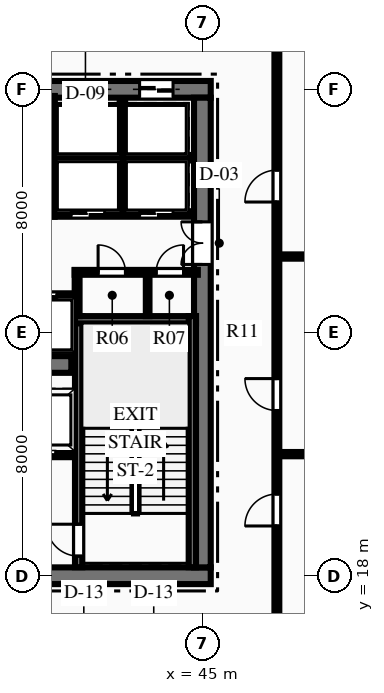
"""IFC4 building model, lengths in metres.
Left out: names, types, materials, properties, quantities, classifications, styles, units other than length and angle.
Written with IfcOpenShell. Run it as: python <this file> out.ifc"""

import sys

from ifc_helpers import new_model, si_unit, direction, frame, frame_2d, origin, place, context, subcontext, project, spatial, rectangle, extrude, element, fill, save


model = new_model("IFC4")
c1 = context("Model", 3, precision=1e-05, world=origin(), true_north=direction((0.0, 1.0)))
c2 = subcontext(c1, "Body", "Model", "MODEL_VIEW")
j1 = project(units=[si_unit("LENGTHUNIT", "METRE"), si_unit("PLANEANGLEUNIT", "RADIAN")], contexts=[c1])
p1 = place(None, origin())
s1 = spatial("IfcSite", under=j1, at=p1, CompositionType="ELEMENT")
p2 = place(p1, origin())
s2 = spatial("IfcBuilding", under=s1, at=p2, CompositionType="ELEMENT")
p3 = place(p2, frame((0.0, 0.0, 90.45)))
s3 = spatial("IfcBuildingStorey", under=s2, at=p3, CompositionType="ELEMENT", Elevation=90.45)
p4 = place(p3, frame((26.725, 18.0, 0.0), z_axis=(0.0, 0.0, 1.0), x_axis=(1.0, 0.0, 0.0)))
e1 = element("IfcWall", 1, at=p4, inside=s3, PredefinedType="SHEAR", context=c2, shape_type="SweptSolid", body=[
    extrude(rectangle(XDim=18.55, YDim=0.55, at=frame_2d((9.275, 0.0))), origin(), (0.0, 0.0, 1.0), 3.75),
])
p5 = place(p4, frame((7.375, 0.0, 0.0)))
e2 = element("IfcOpeningElement", 2, at=p5, cuts=e1, PredefinedType="OPENING", context=c2, shape_type="SweptSolid", body=[
    extrude(rectangle(XDim=1.1, YDim=2.15, at=frame_2d((0.55, 1.075))), frame((0.0, 0.285, 0.0), z_axis=(0.0, -1.0, 0.0), x_axis=(1.0, 0.0, 0.0)), (0.0, 0.0, 1.0), 0.57),
])
p6 = place(p4, frame((10.075, 0.0, 0.0)))
e3 = element("IfcOpeningElement", 3, at=p6, cuts=e1, PredefinedType="OPENING", context=c2, shape_type="SweptSolid", body=[
    extrude(rectangle(XDim=1.1, YDim=2.15, at=frame_2d((0.55, 1.075))), frame((0.0, 0.285, 0.0), z_axis=(0.0, -1.0, 0.0), x_axis=(1.0, 0.0, 0.0)), (0.0, 0.0, 1.0), 0.57),
])
p7 = place(p3, frame((26.725, 34.0, 0.0), z_axis=(0.0, 0.0, 1.0), x_axis=(1.0, 0.0, 0.0)))
e4 = element("IfcWall", 4, at=p7, inside=s3, PredefinedType="SHEAR", context=c2, shape_type="SweptSolid", body=[
    extrude(rectangle(XDim=18.55, YDim=0.55, at=frame_2d((9.275, 0.0))), origin(), (0.0, 0.0, 1.0), 3.75),
])
p8 = place(p7, frame((1.24, 0.0, 0.0)))
e5 = element("IfcOpeningElement", 5, at=p8, cuts=e4, PredefinedType="OPENING", context=c2, shape_type="SweptSolid", body=[
    extrude(rectangle(XDim=1.1, YDim=2.15, at=frame_2d((0.55, 1.075))), frame((0.0, 0.285, 0.0), z_axis=(0.0, -1.0, 0.0), x_axis=(1.0, 0.0, 0.0)), (0.0, 0.0, 1.0), 0.57),
])
p9 = place(p7, frame((3.49, 0.0, 0.0)))
e6 = element("IfcOpeningElement", 6, at=p9, cuts=e4, PredefinedType="OPENING", context=c2, shape_type="SweptSolid", body=[
    extrude(rectangle(XDim=1.1, YDim=2.15, at=frame_2d((0.55, 1.075))), frame((0.0, 0.285, 0.0), z_axis=(0.0, -1.0, 0.0), x_axis=(1.0, 0.0, 0.0)), (0.0, 0.0, 1.0), 0.57),
])
p10 = place(p7, frame((13.96, 0.0, 0.0)))
e7 = element("IfcOpeningElement", 7, at=p10, cuts=e4, PredefinedType="OPENING", context=c2, shape_type="SweptSolid", body=[
    extrude(rectangle(XDim=1.1, YDim=2.15, at=frame_2d((0.55, 1.075))), frame((0.0, 0.285, 0.0), z_axis=(0.0, -1.0, 0.0), x_axis=(1.0, 0.0, 0.0)), (0.0, 0.0, 1.0), 0.57),
])
p11 = place(p7, frame((16.21, 0.0, 0.0)))
e8 = element("IfcOpeningElement", 8, at=p11, cuts=e4, PredefinedType="OPENING", context=c2, shape_type="SweptSolid", body=[
    extrude(rectangle(XDim=1.1, YDim=2.15, at=frame_2d((0.55, 1.075))), frame((0.0, 0.285, 0.0), z_axis=(0.0, -1.0, 0.0), x_axis=(1.0, 0.0, 0.0)), (0.0, 0.0, 1.0), 0.57),
])
p12 = place(p3, frame((45.0, 18.275, 0.0), z_axis=(0.0, 0.0, 1.0), x_axis=(0.0, 1.0, 0.0)))
e9 = element("IfcWall", 9, at=p12, inside=s3, PredefinedType="SHEAR", context=c2, shape_type="SweptSolid", body=[
    extrude(rectangle(XDim=15.45, YDim=0.55, at=frame_2d((7.725, 0.0))), origin(), (0.0, 0.0, 1.0), 3.75),
])
p13 = place(p12, frame((9.965, 0.0, 0.0)))
e10 = element("IfcOpeningElement", 10, at=p13, cuts=e9, PredefinedType="OPENING", context=c2, shape_type="SweptSolid", body=[
    extrude(rectangle(XDim=1.4, YDim=2.2, at=frame_2d((0.7, 1.1))), frame((0.0, 0.285, 0.0), z_axis=(0.0, -1.0, 0.0), x_axis=(1.0, 0.0, 0.0)), (0.0, 0.0, 1.0), 0.57),
])
p14 = place(p3, frame((31.31, 24.95, 0.0), z_axis=(0.0, 0.0, 1.0), x_axis=(1.0, 0.0, 0.0)))
e11 = element("IfcWall", 11, at=p14, inside=s3, PredefinedType="SHEAR", context=c2, shape_type="SweptSolid", body=[
    extrude(rectangle(XDim=9.38, YDim=0.55, at=frame_2d((4.69, 0.0))), origin(), (0.0, 0.0, 1.0), 3.75),
])
p15 = place(p3, frame((40.93, 18.28, 0.0), z_axis=(0.0, 0.0, 1.0), x_axis=(0.0, 1.0, 0.0)))
e12 = element("IfcWall", 12, at=p15, inside=s3, PredefinedType="SHEAR", context=c2, shape_type="SweptSolid", body=[
    extrude(rectangle(XDim=8.26, YDim=0.24, at=frame_2d((4.13, 0.0))), origin(), (0.0, 0.0, 1.0), 3.75),
])
p16 = place(p15, frame((0.365, 0.0, 0.0)))
e13 = element("IfcOpeningElement", 13, at=p16, cuts=e12, PredefinedType="OPENING", context=c2, shape_type="SweptSolid", body=[
    extrude(rectangle(XDim=1.05, YDim=2.15, at=frame_2d((0.525, 1.075))), frame((0.0, 0.13, 0.0), z_axis=(0.0, -1.0, 0.0), x_axis=(1.0, 0.0, 0.0)), (0.0, 0.0, 1.0), 0.26),
])
p17 = place(p3, frame((40.81, 26.42, 0.0), z_axis=(0.0, 0.0, 1.0), x_axis=(1.0, 0.0, 0.0)))
e14 = element("IfcWall", 14, at=p17, inside=s3, PredefinedType="SHEAR", context=c2, shape_type="SweptSolid", body=[
    extrude(rectangle(XDim=3.98, YDim=0.24, at=frame_2d((1.99, 0.0))), origin(), (0.0, 0.0, 1.0), 3.75),
])
p18 = place(p3, frame((44.67, 18.28, 0.0), z_axis=(0.0, 0.0, 1.0), x_axis=(0.0, 1.0, 0.0)))
e15 = element("IfcWall", 15, at=p18, inside=s3, PredefinedType="SHEAR", context=c2, shape_type="SweptSolid", body=[
    extrude(rectangle(XDim=8.26, YDim=0.24, at=frame_2d((4.13, 0.0))), origin(), (0.0, 0.0, 1.0), 3.75),
])
p19 = place(p3, frame((31.76, 29.93, 0.0), z_axis=(0.0, 0.0, 1.0), x_axis=(1.0, 0.0, 0.0)))
e16 = element("IfcWall", 16, at=p19, inside=s3, PredefinedType="SHEAR", context=c2, shape_type="SweptSolid", body=[
    extrude(rectangle(XDim=8.38, YDim=0.24, at=frame_2d((4.19, 0.0))), origin(), (0.0, 0.0, 1.0), 3.75),
])
p20 = place(p19, frame((0.565, 0.0, 0.0)))
e17 = element("IfcOpeningElement", 17, at=p20, cuts=e16, PredefinedType="OPENING", context=c2, shape_type="SweptSolid", body=[
    extrude(rectangle(XDim=1.05, YDim=2.15, at=frame_2d((0.525, 1.075))), frame((0.0, 0.13, 0.0), z_axis=(0.0, -1.0, 0.0), x_axis=(1.0, 0.0, 0.0)), (0.0, 0.0, 1.0), 0.26),
])
p21 = place(p3, frame((40.02, 29.93, 0.0), z_axis=(0.0, 0.0, 1.0), x_axis=(0.0, 1.0, 0.0)))
e18 = element("IfcWall", 18, at=p21, inside=s3, PredefinedType="SHEAR", context=c2, shape_type="SweptSolid", body=[
    extrude(rectangle(XDim=3.85, YDim=0.24, at=frame_2d((1.925, 0.0))), origin(), (0.0, 0.0, 1.0), 3.75),
])
p22 = place(p3, frame((37.85, 33.66, 0.0), z_axis=(0.0, 0.0, 1.0), x_axis=(1.0, 0.0, 0.0)))
e19 = element("IfcWall", 19, at=p22, inside=s3, PredefinedType="SHEAR", context=c2, shape_type="SweptSolid", body=[
    extrude(rectangle(XDim=2.29, YDim=0.24, at=frame_2d((1.145, 0.0))), origin(), (0.0, 0.0, 1.0), 3.75),
])
p23 = place(p3, frame((36.12, 22.0, 0.0), z_axis=(0.0, 0.0, 1.0), x_axis=(1.0, 0.0, 0.0)))
e20 = element("IfcWall", 20, at=p23, inside=s3, PredefinedType="PARTITIONING", context=c2, shape_type="SweptSolid", body=[
    extrude(rectangle(XDim=4.69, YDim=0.2, at=frame_2d((2.345, 0.0))), origin(), (0.0, 0.0, 1.0), 3.45),
])
p24 = place(p23, frame((2.955, 0.0, 0.0)))
e21 = element("IfcOpeningElement", 21, at=p24, cuts=e20, PredefinedType="OPENING", context=c2, shape_type="SweptSolid", body=[
    extrude(rectangle(XDim=1.1, YDim=2.15, at=frame_2d((0.55, 1.075))), frame((0.0, 0.11, 0.0), z_axis=(0.0, -1.0, 0.0), x_axis=(1.0, 0.0, 0.0)), (0.0, 0.0, 1.0), 0.22),
])
p25 = place(p23, frame((0.08, 0.0, 0.0)))
e22 = element("IfcOpeningElement", 22, at=p25, cuts=e20, PredefinedType="OPENING", context=c2, shape_type="SweptSolid", body=[
    extrude(rectangle(XDim=1.4, YDim=2.2, at=frame_2d((0.7, 1.1))), frame((0.0, 0.11, 0.0), z_axis=(0.0, -1.0, 0.0), x_axis=(1.0, 0.0, 0.0)), (0.0, 0.0, 1.0), 0.22),
])
p26 = place(p3, frame((40.8, 27.98, 0.0), z_axis=(0.0, 0.0, 1.0), x_axis=(1.0, 0.0, 0.0)))
e23 = element("IfcWall", 23, at=p26, inside=s3, PredefinedType="PARTITIONING", context=c2, shape_type="SweptSolid", body=[
    extrude(rectangle(XDim=4.05, YDim=0.16, at=frame_2d((2.025, 0.0))), origin(), (0.0, 0.0, 1.0), 3.45),
])
p27 = place(p26, frame((0.77, 0.0, 0.0)))
e24 = element("IfcOpeningElement", 24, at=p27, cuts=e23, PredefinedType="OPENING", context=c2, shape_type="SweptSolid", body=[
    extrude(rectangle(XDim=0.9, YDim=2.15, at=frame_2d((0.45, 1.075))), frame((0.0, 0.09, 0.0), z_axis=(0.0, -1.0, 0.0), x_axis=(1.0, 0.0, 0.0)), (0.0, 0.0, 1.0), 0.18),
])
p28 = place(p26, frame((2.68, 0.0, 0.0)))
e25 = element("IfcOpeningElement", 25, at=p28, cuts=e23, PredefinedType="OPENING", context=c2, shape_type="SweptSolid", body=[
    extrude(rectangle(XDim=0.9, YDim=2.15, at=frame_2d((0.45, 1.075))), frame((0.0, 0.09, 0.0), z_axis=(0.0, -1.0, 0.0), x_axis=(1.0, 0.0, 0.0)), (0.0, 0.0, 1.0), 0.18),
])
p29 = place(p3, frame((40.88, 26.54, 0.0), z_axis=(0.0, 0.0, 1.0), x_axis=(0.0, 1.0, 0.0)))
e26 = element("IfcWall", 26, at=p29, inside=s3, PredefinedType="PARTITIONING", context=c2, shape_type="SweptSolid", body=[
    extrude(rectangle(XDim=1.51, YDim=0.16, at=frame_2d((0.755, 0.0))), origin(), (0.0, 0.0, 1.0), 3.45),
])
p30 = place(p3, frame((43.2, 26.54, 0.0), z_axis=(0.0, 0.0, 1.0), x_axis=(0.0, 1.0, 0.0)))
e27 = element("IfcWall", 27, at=p30, inside=s3, PredefinedType="PARTITIONING", context=c2, shape_type="SweptSolid", body=[
    extrude(rectangle(XDim=1.44, YDim=0.12, at=frame_2d((0.72, 0.0))), origin(), (0.0, 0.0, 1.0), 3.45),
])
p31 = place(p3, frame((40.12, 29.9, 0.0), z_axis=(0.0, 0.0, 1.0), x_axis=(1.0, 0.0, 0.0)))
e28 = element("IfcWall", 28, at=p31, inside=s3, PredefinedType="PARTITIONING", context=c2, shape_type="SweptSolid", body=[
    extrude(rectangle(XDim=4.43, YDim=0.18, at=frame_2d((2.215, 0.0))), origin(), (0.0, 0.0, 1.0), 3.45),
])
p32 = place(p31, frame((0.565, 0.0, 0.0)))
e29 = element("IfcOpeningElement", 29, at=p32, cuts=e28, PredefinedType="OPENING", context=c2, shape_type="SweptSolid", body=[
    extrude(rectangle(XDim=1.1, YDim=2.15, at=frame_2d((0.55, 1.075))), frame((0.0, 0.1, 0.0), z_axis=(0.0, -1.0, 0.0), x_axis=(1.0, 0.0, 0.0)), (0.0, 0.0, 1.0), 0.2),
])
p33 = place(p31, frame((2.815, 0.0, 0.0)))
e30 = element("IfcOpeningElement", 30, at=p33, cuts=e28, PredefinedType="OPENING", context=c2, shape_type="SweptSolid", body=[
    extrude(rectangle(XDim=1.1, YDim=2.15, at=frame_2d((0.55, 1.075))), frame((0.0, 0.1, 0.0), z_axis=(0.0, -1.0, 0.0), x_axis=(1.0, 0.0, 0.0)), (0.0, 0.0, 1.0), 0.2),
])
p34 = place(p3, frame((40.12, 31.75, 0.0), z_axis=(0.0, 0.0, 1.0), x_axis=(1.0, 0.0, 0.0)))
e31 = element("IfcWall", 31, at=p34, inside=s3, PredefinedType="PARTITIONING", context=c2, shape_type="SweptSolid", body=[
    extrude(rectangle(XDim=4.43, YDim=0.18, at=frame_2d((2.215, 0.0))), origin(), (0.0, 0.0, 1.0), 3.45),
])
p35 = place(p3, frame((42.37, 29.9, 0.0), z_axis=(0.0, 0.0, 1.0), x_axis=(0.0, 1.0, 0.0)))
e32 = element("IfcWall", 32, at=p35, inside=s3, PredefinedType="PARTITIONING", context=c2, shape_type="SweptSolid", body=[
    extrude(rectangle(XDim=3.75, YDim=0.18, at=frame_2d((1.875, 0.0))), origin(), (0.0, 0.0, 1.0), 3.45),
])
p36 = place(p3, frame((31.2, 27.2, 0.0), z_axis=(0.0, 0.0, 1.0), x_axis=(1.0, 0.0, 0.0)))
e33 = element("IfcWall", 33, at=p36, inside=s3, PredefinedType="PARTITIONING", context=c2, shape_type="SweptSolid", body=[
    extrude(rectangle(XDim=9.6, YDim=0.18, at=frame_2d((4.8, 0.0))), origin(), (0.0, 0.0, 1.0), 3.45),
])
p37 = place(p36, frame((0.59, 0.0, 0.0)))
e34 = element("IfcOpeningElement", 34, at=p37, cuts=e33, PredefinedType="OPENING", context=c2, shape_type="SweptSolid", body=[
    extrude(rectangle(XDim=1.1, YDim=2.15, at=frame_2d((0.55, 1.075))), frame((0.0, 0.1, 0.0), z_axis=(0.0, -1.0, 0.0), x_axis=(1.0, 0.0, 0.0)), (0.0, 0.0, 1.0), 0.2),
])
p38 = place(p36, frame((2.99, 0.0, 0.0)))
e35 = element("IfcOpeningElement", 35, at=p38, cuts=e33, PredefinedType="OPENING", context=c2, shape_type="SweptSolid", body=[
    extrude(rectangle(XDim=1.1, YDim=2.15, at=frame_2d((0.55, 1.075))), frame((0.0, 0.1, 0.0), z_axis=(0.0, -1.0, 0.0), x_axis=(1.0, 0.0, 0.0)), (0.0, 0.0, 1.0), 0.2),
])
p39 = place(p36, frame((5.51, 0.0, 0.0)))
e36 = element("IfcOpeningElement", 36, at=p39, cuts=e33, PredefinedType="OPENING", context=c2, shape_type="SweptSolid", body=[
    extrude(rectangle(XDim=1.1, YDim=2.15, at=frame_2d((0.55, 1.075))), frame((0.0, 0.1, 0.0), z_axis=(0.0, -1.0, 0.0), x_axis=(1.0, 0.0, 0.0)), (0.0, 0.0, 1.0), 0.2),
])
p40 = place(p36, frame((7.91, 0.0, 0.0)))
e37 = element("IfcOpeningElement", 37, at=p40, cuts=e33, PredefinedType="OPENING", context=c2, shape_type="SweptSolid", body=[
    extrude(rectangle(XDim=1.1, YDim=2.15, at=frame_2d((0.55, 1.075))), frame((0.0, 0.1, 0.0), z_axis=(0.0, -1.0, 0.0), x_axis=(1.0, 0.0, 0.0)), (0.0, 0.0, 1.0), 0.2),
])
p41 = place(p3, frame((47.45, 15.55, 0.0), z_axis=(0.0, 0.0, 1.0), x_axis=(0.0, 1.0, 0.0)))
e38 = element("IfcWall", 38, at=p41, inside=s3, PredefinedType="PARTITIONING", context=c2, shape_type="SweptSolid", body=[
    extrude(rectangle(XDim=20.9, YDim=0.16, at=frame_2d((10.45, 0.0))), origin(), (0.0, 0.0, 1.0), 3.45),
])
p42 = place(p41, frame((4.087, 0.0, 0.0)))
e39 = element("IfcOpeningElement", 39, at=p42, cuts=e38, PredefinedType="OPENING", context=c2, shape_type="SweptSolid", body=[
    extrude(rectangle(XDim=1.05, YDim=2.15, at=frame_2d((0.525, 1.075))), frame((0.0, 0.09, 0.0), z_axis=(0.0, -1.0, 0.0), x_axis=(1.0, 0.0, 0.0)), (0.0, 0.0, 1.0), 0.18),
])
p43 = place(p41, frame((7.885, 0.0, 0.0)))
e40 = element("IfcOpeningElement", 40, at=p43, cuts=e38, PredefinedType="OPENING", context=c2, shape_type="SweptSolid", body=[
    extrude(rectangle(XDim=1.05, YDim=2.15, at=frame_2d((0.525, 1.075))), frame((0.0, 0.09, 0.0), z_axis=(0.0, -1.0, 0.0), x_axis=(1.0, 0.0, 0.0)), (0.0, 0.0, 1.0), 0.18),
])
p44 = place(p41, frame((14.743, 0.0, 0.0)))
e41 = element("IfcOpeningElement", 41, at=p44, cuts=e38, PredefinedType="OPENING", context=c2, shape_type="SweptSolid", body=[
    extrude(rectangle(XDim=1.05, YDim=2.15, at=frame_2d((0.525, 1.075))), frame((0.0, 0.09, 0.0), z_axis=(0.0, -1.0, 0.0), x_axis=(1.0, 0.0, 0.0)), (0.0, 0.0, 1.0), 0.18),
])
p45 = place(p3, frame((47.45, 22.0, 0.0), z_axis=(0.0, 0.0, 1.0), x_axis=(1.0, 0.0, 0.0)))
e42 = element("IfcWall", 42, at=p45, inside=s3, PredefinedType="PARTITIONING", context=c2, shape_type="SweptSolid", body=[
    extrude(rectangle(XDim=17.345, YDim=0.14, at=frame_2d((8.672, 0.0))), origin(), (0.0, 0.0, 1.0), 3.45),
])
p46 = place(p3, frame((47.45, 28.5, 0.0), z_axis=(0.0, 0.0, 1.0), x_axis=(1.0, 0.0, 0.0)))
e43 = element("IfcWall", 43, at=p46, inside=s3, PredefinedType="PARTITIONING", context=c2, shape_type="SweptSolid", body=[
    extrude(rectangle(XDim=15.183, YDim=0.14, at=frame_2d((7.591, 0.0))), origin(), (0.0, 0.0, 1.0), 3.45),
])
p47 = place(p27, origin())
e44 = element("IfcDoor", 44, at=p47, inside=s3, OperationType="SINGLE_SWING_LEFT", PredefinedType="DOOR", context=c2, shape_type="SweptSolid", body=[
    extrude(rectangle(XDim=0.9, YDim=2.15, at=frame_2d((0.45, 1.075))), frame((0.0, 0.025, 0.0), z_axis=(0.0, -1.0, 0.0), x_axis=(1.0, 0.0, 0.0)), (0.0, 0.0, 1.0), 0.05),
])
fill(e24, e44)
p48 = place(p28, origin())
e45 = element("IfcDoor", 45, at=p48, inside=s3, OperationType="SINGLE_SWING_RIGHT", PredefinedType="DOOR", context=c2, shape_type="SweptSolid", body=[
    extrude(rectangle(XDim=0.9, YDim=2.15, at=frame_2d((0.45, 1.075))), frame((0.0, 0.025, 0.0), z_axis=(0.0, -1.0, 0.0), x_axis=(1.0, 0.0, 0.0)), (0.0, 0.0, 1.0), 0.05),
])
fill(e25, e45)
p49 = place(p16, origin())
e46 = element("IfcDoor", 46, at=p49, inside=s3, OperationType="SINGLE_SWING_RIGHT", PredefinedType="DOOR", context=c2, shape_type="SweptSolid", body=[
    extrude(rectangle(XDim=1.05, YDim=2.15, at=frame_2d((0.525, 1.075))), frame((0.0, 0.025, 0.0), z_axis=(0.0, -1.0, 0.0), x_axis=(1.0, 0.0, 0.0)), (0.0, 0.0, 1.0), 0.05),
])
fill(e13, e46)
p50 = place(p13, origin())
e47 = element("IfcDoor", 47, at=p50, inside=s3, OperationType="DOUBLE_DOOR_SINGLE_SWING", PredefinedType="DOOR", context=c2, shape_type="SweptSolid", body=[
    extrude(rectangle(XDim=1.4, YDim=2.2, at=frame_2d((0.7, 1.1))), frame((0.0, 0.025, 0.0), z_axis=(0.0, -1.0, 0.0), x_axis=(1.0, 0.0, 0.0)), (0.0, 0.0, 1.0), 0.05),
])
fill(e10, e47)
p51 = place(p42, origin())
e48 = element("IfcDoor", 48, at=p51, inside=s3, OperationType="SINGLE_SWING_LEFT", PredefinedType="DOOR", context=c2, shape_type="SweptSolid", body=[
    extrude(rectangle(XDim=1.05, YDim=2.15, at=frame_2d((0.525, 1.075))), frame((0.0, 0.025, 0.0), z_axis=(0.0, -1.0, 0.0), x_axis=(1.0, 0.0, 0.0)), (0.0, 0.0, 1.0), 0.05),
])
fill(e39, e48)
p52 = place(p43, origin())
e49 = element("IfcDoor", 49, at=p52, inside=s3, OperationType="SINGLE_SWING_RIGHT", PredefinedType="DOOR", context=c2, shape_type="SweptSolid", body=[
    extrude(rectangle(XDim=1.05, YDim=2.15, at=frame_2d((0.525, 1.075))), frame((0.0, 0.025, 0.0), z_axis=(0.0, -1.0, 0.0), x_axis=(1.0, 0.0, 0.0)), (0.0, 0.0, 1.0), 0.05),
])
fill(e40, e49)
p53 = place(p44, origin())
e50 = element("IfcDoor", 50, at=p53, inside=s3, OperationType="SINGLE_SWING_LEFT", PredefinedType="DOOR", context=c2, shape_type="SweptSolid", body=[
    extrude(rectangle(XDim=1.05, YDim=2.15, at=frame_2d((0.525, 1.075))), frame((0.0, 0.025, 0.0), z_axis=(0.0, -1.0, 0.0), x_axis=(1.0, 0.0, 0.0)), (0.0, 0.0, 1.0), 0.05),
])
fill(e41, e50)
p54 = place(p32, origin())
e51 = element("IfcDoor", 51, at=p54, inside=s3, OperationType="SLIDING_TO_LEFT", PredefinedType="DOOR", context=c2, shape_type="SweptSolid", body=[
    extrude(rectangle(XDim=1.1, YDim=2.15, at=frame_2d((0.55, 1.075))), frame((0.0, 0.025, 0.0), z_axis=(0.0, -1.0, 0.0), x_axis=(1.0, 0.0, 0.0)), (0.0, 0.0, 1.0), 0.05),
])
fill(e29, e51)
p55 = place(p33, origin())
e52 = element("IfcDoor", 52, at=p55, inside=s3, OperationType="SLIDING_TO_LEFT", PredefinedType="DOOR", context=c2, shape_type="SweptSolid", body=[
    extrude(rectangle(XDim=1.1, YDim=2.15, at=frame_2d((0.55, 1.075))), frame((0.0, 0.025, 0.0), z_axis=(0.0, -1.0, 0.0), x_axis=(1.0, 0.0, 0.0)), (0.0, 0.0, 1.0), 0.05),
])
fill(e30, e52)
p56 = place(p10, origin())
e53 = element("IfcDoor", 53, at=p56, inside=s3, OperationType="SLIDING_TO_LEFT", PredefinedType="DOOR", context=c2, shape_type="SweptSolid", body=[
    extrude(rectangle(XDim=1.1, YDim=2.15, at=frame_2d((0.55, 1.075))), frame((0.0, 0.025, 0.0), z_axis=(0.0, -1.0, 0.0), x_axis=(1.0, 0.0, 0.0)), (0.0, 0.0, 1.0), 0.05),
])
fill(e7, e53)
p57 = place(p11, origin())
e54 = element("IfcDoor", 54, at=p57, inside=s3, OperationType="SLIDING_TO_LEFT", PredefinedType="DOOR", context=c2, shape_type="SweptSolid", body=[
    extrude(rectangle(XDim=1.1, YDim=2.15, at=frame_2d((0.55, 1.075))), frame((0.0, 0.025, 0.0), z_axis=(0.0, -1.0, 0.0), x_axis=(1.0, 0.0, 0.0)), (0.0, 0.0, 1.0), 0.05),
])
fill(e8, e54)
p58 = place(p40, origin())
e55 = element("IfcDoor", 55, at=p58, inside=s3, OperationType="SLIDING_TO_LEFT", PredefinedType="DOOR", context=c2, shape_type="SweptSolid", body=[
    extrude(rectangle(XDim=1.1, YDim=2.15, at=frame_2d((0.55, 1.075))), frame((0.0, 0.025, 0.0), z_axis=(0.0, -1.0, 0.0), x_axis=(1.0, 0.0, 0.0)), (0.0, 0.0, 1.0), 0.05),
])
fill(e37, e55)
p59 = place(p24, origin())
e56 = element("IfcDoor", 56, at=p59, inside=s3, OperationType="SLIDING_TO_LEFT", PredefinedType="DOOR", context=c2, shape_type="SweptSolid", body=[
    extrude(rectangle(XDim=1.1, YDim=2.15, at=frame_2d((0.55, 1.075))), frame((0.0, 0.025, 0.0), z_axis=(0.0, -1.0, 0.0), x_axis=(1.0, 0.0, 0.0)), (0.0, 0.0, 1.0), 0.05),
])
fill(e21, e56)
save(model, sys.argv[1])
